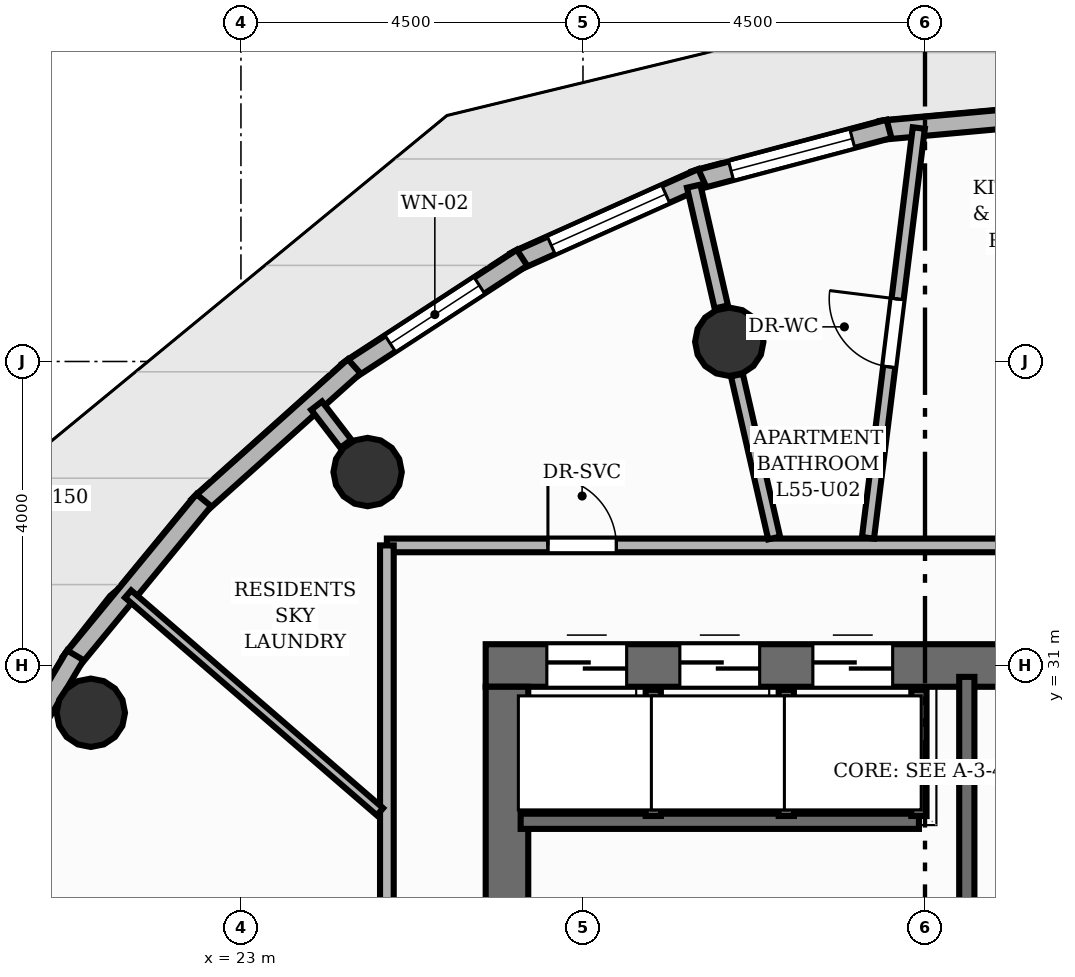
"""IFC4 building model, lengths in metres.
Left out: names, types, materials, properties, quantities, classifications, styles, units other than length and angle.
Written with IfcOpenShell. Run it as: python <this file> out.ifc"""

import sys

from ifc_helpers import new_model, si_unit, direction, frame, frame_2d, origin, origin_2d, place, context, subcontext, project, spatial, rectangle, circle, extrude, element, fill, save


model = new_model("IFC4")
c1 = context("Model", 3, precision=1e-05, world=origin(), true_north=direction((0.0, 1.0)))
c2 = subcontext(c1, "Body", "Model", "MODEL_VIEW")
j1 = project(units=[si_unit("LENGTHUNIT", "METRE"), si_unit("PLANEANGLEUNIT", "RADIAN")], contexts=[c1])
p1 = place(None, origin())
s1 = spatial("IfcSite", under=j1, at=p1, CompositionType="ELEMENT")
p2 = place(p1, origin())
s2 = spatial("IfcBuilding", under=s1, at=p2, CompositionType="ELEMENT")
p3 = place(p2, frame((0.0, 0.0, 185.44)))
s3 = spatial("IfcBuildingStorey", under=s2, at=p3, CompositionType="ELEMENT", Elevation=185.44)
p4 = place(p3, frame((26.22, 31.0, 0.0), z_axis=(0.0, 0.0, 1.0), x_axis=(1.0, 0.0, 0.0)))
e1 = element("IfcWall", 1, at=p4, inside=s3, PredefinedType="SHEAR", context=c2, shape_type="SweptSolid", body=[
    extrude(rectangle(XDim=11.56, YDim=0.56, at=frame_2d((5.78, 0.0))), origin(), (0.0, 0.0, 1.0), 3.2),
])
p5 = place(p4, frame((8.18, 0.0, 0.0)))
e2 = element("IfcOpeningElement", 2, at=p5, cuts=e1, PredefinedType="OPENING", context=c2, shape_type="SweptSolid", body=[
    extrude(rectangle(XDim=1.1, YDim=2.15, at=frame_2d((0.55, 1.075))), frame((0.0, 0.29, 0.0), z_axis=(0.0, -1.0, 0.0), x_axis=(1.0, 0.0, 0.0)), (0.0, 0.0, 1.0), 0.58),
])
p6 = place(p4, frame((0.805, 0.0, 0.0)))
e3 = element("IfcOpeningElement", 3, at=p6, cuts=e1, PredefinedType="OPENING", context=c2, shape_type="SweptSolid", body=[
    extrude(rectangle(XDim=1.05, YDim=2.15, at=frame_2d((0.525, 1.075))), frame((0.0, 0.29, 0.0), z_axis=(0.0, -1.0, 0.0), x_axis=(1.0, 0.0, 0.0)), (0.0, 0.0, 1.0), 0.58),
])
p7 = place(p4, frame((2.555, 0.0, 0.0)))
e4 = element("IfcOpeningElement", 4, at=p7, cuts=e1, PredefinedType="OPENING", context=c2, shape_type="SweptSolid", body=[
    extrude(rectangle(XDim=1.05, YDim=2.15, at=frame_2d((0.525, 1.075))), frame((0.0, 0.29, 0.0), z_axis=(0.0, -1.0, 0.0), x_axis=(1.0, 0.0, 0.0)), (0.0, 0.0, 1.0), 0.58),
])
p8 = place(p4, frame((4.305, 0.0, 0.0)))
e5 = element("IfcOpeningElement", 5, at=p8, cuts=e1, PredefinedType="OPENING", context=c2, shape_type="SweptSolid", body=[
    extrude(rectangle(XDim=1.05, YDim=2.15, at=frame_2d((0.525, 1.075))), frame((0.0, 0.29, 0.0), z_axis=(0.0, -1.0, 0.0), x_axis=(1.0, 0.0, 0.0)), (0.0, 0.0, 1.0), 0.58),
])
p9 = place(p3, frame((26.5, 17.28, 0.0), z_axis=(0.0, 0.0, 1.0), x_axis=(0.0, 1.0, 0.0)))
e6 = element("IfcWall", 6, at=p9, inside=s3, PredefinedType="SHEAR", context=c2, shape_type="SweptSolid", body=[
    extrude(rectangle(XDim=13.44, YDim=0.56, at=frame_2d((6.72, 0.0))), origin(), (0.0, 0.0, 1.0), 3.2),
])
for number, where, z_axis, x_axis in (
    (7, (29.425, 35.26, 0.0), (0.0, 0.0, 1.0), (1.0, 0.0, 0.0)),
    (8, (24.667, 33.545, 0.0), (0.0, 0.0, 1.0), (1.0, 0.0, 0.0)),
    (9, (21.025, 30.378, 0.0), (0.0, 0.0, 1.0), (1.0, 0.0, 0.0)),
):
    element("IfcColumn", number, at=place(p3, frame(where, z_axis=z_axis, x_axis=x_axis)), inside=s3, PredefinedType="COLUMN", context=c2, shape_type="SweptSolid", body=[
        extrude(circle(Radius=0.45, at=origin_2d()), origin(), (0.0, 0.0, 1.0), 3.2),
    ])
p10 = place(p3, frame((31.418, 38.042, 0.0), z_axis=(0.0, 0.0, 1.0), x_axis=(0.995895522128, 0.090510270169, 0.0)))
e10 = element("IfcWall", 10, at=p10, inside=s3, PredefinedType="SOLIDWALL", context=c2, shape_type="SweptSolid", body=[
    extrude(rectangle(XDim=2.592, YDim=0.25, at=frame_2d((1.296, 0.0))), origin(), (0.0, 0.0, 1.0), 2.96),
])
p11 = place(p3, frame((28.965, 37.381, 0.0), z_axis=(0.0, 0.0, 1.0), x_axis=(0.96652474621, 0.256573410476, 0.0)))
e11 = element("IfcWall", 11, at=p11, inside=s3, PredefinedType="SOLIDWALL", context=c2, shape_type="SweptSolid", body=[
    extrude(rectangle(XDim=2.651, YDim=0.25, at=frame_2d((1.325, 0.0))), origin(), (0.0, 0.0, 1.0), 2.96),
])
p12 = place(p11, frame((0.501, 0.0, 0.85)))
e12 = element("IfcOpeningElement", 12, at=p12, cuts=e11, PredefinedType="OPENING", context=c2, shape_type="SweptSolid", body=[
    extrude(rectangle(XDim=1.65, YDim=1.55, at=frame_2d((0.825, 0.775))), frame((0.0, 0.135, 0.0), z_axis=(0.0, -1.0, 0.0), x_axis=(1.0, 0.0, 0.0)), (0.0, 0.0, 1.0), 0.27),
])
p13 = place(p3, frame((26.603, 36.313, 0.0), z_axis=(0.0, 0.0, 1.0), x_axis=(0.912615139532, 0.408819773368, 0.0)))
e13 = element("IfcWall", 13, at=p13, inside=s3, PredefinedType="SOLIDWALL", context=c2, shape_type="SweptSolid", body=[
    extrude(rectangle(XDim=2.702, YDim=0.25, at=frame_2d((1.351, 0.0))), origin(), (0.0, 0.0, 1.0), 2.96),
])
p14 = place(p13, frame((0.526, 0.0, 0.85)))
e14 = element("IfcOpeningElement", 14, at=p14, cuts=e13, PredefinedType="OPENING", context=c2, shape_type="SweptSolid", body=[
    extrude(rectangle(XDim=1.65, YDim=1.55, at=frame_2d((0.825, 0.775))), frame((0.0, 0.135, 0.0), z_axis=(0.0, -1.0, 0.0), x_axis=(1.0, 0.0, 0.0)), (0.0, 0.0, 1.0), 0.27),
])
p15 = place(p3, frame((24.404, 34.87, 0.0), z_axis=(0.0, 0.0, 1.0), x_axis=(0.837860586987, 0.545884270496, 0.0)))
e15 = element("IfcWall", 15, at=p15, inside=s3, PredefinedType="SOLIDWALL", context=c2, shape_type="SweptSolid", body=[
    extrude(rectangle(XDim=2.739, YDim=0.25, at=frame_2d((1.369, 0.0))), origin(), (0.0, 0.0, 1.0), 2.96),
])
p16 = place(p15, frame((0.669, 0.0, 0.85)))
e16 = element("IfcOpeningElement", 16, at=p16, cuts=e15, PredefinedType="OPENING", context=c2, shape_type="SweptSolid", body=[
    extrude(rectangle(XDim=1.4, YDim=1.55, at=frame_2d((0.7, 0.775))), frame((0.0, 0.135, 0.0), z_axis=(0.0, -1.0, 0.0), x_axis=(1.0, 0.0, 0.0)), (0.0, 0.0, 1.0), 0.27),
])
for number, where, z_axis, x_axis in (
    (17, (22.436, 33.096, 0.0), (0.0, 0.0, 1.0), (0.745, 0.667, 0.0)),
    (18, (20.759, 31.045, 0.0), (0.0, 0.0, 1.0), (0.635, 0.772, 0.0)),
):
    element("IfcWall", number, at=place(p3, frame(where, z_axis=z_axis, x_axis=x_axis)), inside=s3, PredefinedType="SOLIDWALL", context=c2, shape_type="SweptSolid", body=[
        extrude(rectangle(XDim=2.758, YDim=0.25, at=frame_2d((1.379, 0.0))), origin(), (0.0, 0.0, 1.0), 2.96),
    ])
p17 = place(p3, frame((19.424, 28.779, 0.0), z_axis=(0.0, 0.0, 1.0), x_axis=(0.510320389621, 0.859984360287, 0.0)))
e19 = element("IfcWall", 19, at=p17, inside=s3, PredefinedType="SOLIDWALL", context=c2, shape_type="SweptSolid", body=[
    extrude(rectangle(XDim=2.738, YDim=0.25, at=frame_2d((1.369, 0.0))), origin(), (0.0, 0.0, 1.0), 2.96),
])
p18 = place(p17, frame((0.175, 0.0, 0.85)))
e20 = element("IfcOpeningElement", 20, at=p18, cuts=e19, PredefinedType="OPENING", context=c2, shape_type="SweptSolid", body=[
    extrude(rectangle(XDim=1.4, YDim=1.55, at=frame_2d((0.7, 0.775))), frame((0.0, 0.135, 0.0), z_axis=(0.0, -1.0, 0.0), x_axis=(1.0, 0.0, 0.0)), (0.0, 0.0, 1.0), 0.27),
])
p19 = place(p3, frame((32.55, 27.35, 0.0), z_axis=(0.0, 0.0, 1.0), x_axis=(0.0, 1.0, 0.0)))
e21 = element("IfcWall", 21, at=p19, inside=s3, PredefinedType="SHEAR", context=c2, shape_type="SweptSolid", body=[
    extrude(rectangle(XDim=3.5, YDim=0.2, at=frame_2d((1.75, 0.0))), origin(), (0.0, 0.0, 1.0), 3.2),
])
p20 = place(p3, frame((26.68, 28.95, 0.0), z_axis=(0.0, 0.0, 1.0), x_axis=(1.0, 0.0, 0.0)))
e22 = element("IfcWall", 22, at=p20, inside=s3, PredefinedType="SHEAR", context=c2, shape_type="SweptSolid", body=[
    extrude(rectangle(XDim=5.24, YDim=0.2, at=frame_2d((2.62, 0.0))), origin(), (0.0, 0.0, 1.0), 3.2),
])
for number, where, z_axis, x_axis in (
    (23, (31.92, 29.02, 0.0), (0.0, 0.0, 1.0), (0.0, 1.0, 0.0)),
    (24, (28.425, 29.02, 0.0), (0.0, 0.0, 1.0), (0.0, 1.0, 0.0)),
    (25, (30.175, 29.02, 0.0), (0.0, 0.0, 1.0), (0.0, 1.0, 0.0)),
):
    element("IfcWall", number, at=place(p3, frame(where, z_axis=z_axis, x_axis=x_axis)), inside=s3, PredefinedType="SHEAR", context=c2, shape_type="SweptSolid", body=[
        extrude(rectangle(XDim=1.66, YDim=0.2, at=frame_2d((0.83, 0.0))), origin(), (0.0, 0.0, 1.0), 3.2),
    ])
p21 = place(p3, frame((29.32, 35.718, 0.0), z_axis=(0.0, 0.0, 1.0), x_axis=(-0.222967107114, 0.974825968645, 0.0)))
e26 = element("IfcWall", 26, at=p21, inside=s3, PredefinedType="PARTITIONING", context=c2, shape_type="SweptSolid", body=[
    extrude(rectangle(XDim=1.63, YDim=0.18, at=frame_2d((0.815, 0.0))), origin(), (0.0, 0.0, 1.0), 2.404),
])
p22 = place(p3, frame((24.38, 33.918, 0.0), z_axis=(0.0, 0.0, 1.0), x_axis=(-0.609112888366, 0.793083532314, 0.0)))
e27 = element("IfcWall", 27, at=p22, inside=s3, PredefinedType="PARTITIONING", context=c2, shape_type="SweptSolid", body=[
    extrude(rectangle(XDim=0.632, YDim=0.18, at=frame_2d((0.316, 0.0))), origin(), (0.0, 0.0, 1.0), 2.404),
])
p23 = place(p3, frame((24.92, 32.58, 0.0), z_axis=(0.0, 0.0, 1.0), x_axis=(1.0, 0.0, 0.0)))
e28 = element("IfcWall", 28, at=p23, inside=s3, PredefinedType="PARTITIONING", context=c2, shape_type="SweptSolid", body=[
    extrude(rectangle(XDim=14.16, YDim=0.18, at=frame_2d((7.08, 0.0))), origin(), (0.0, 0.0, 1.0), 2.955),
])
p24 = place(p23, frame((8.186, 0.0, 0.0)))
e29 = element("IfcOpeningElement", 29, at=p24, cuts=e28, PredefinedType="OPENING", context=c2, shape_type="SweptSolid", body=[
    extrude(rectangle(XDim=1.05, YDim=2.15, at=frame_2d((0.525, 1.075))), frame((0.0, 0.1, 0.0), z_axis=(0.0, -1.0, 0.0), x_axis=(1.0, 0.0, 0.0)), (0.0, 0.0, 1.0), 0.2),
])
p25 = place(p23, frame((2.119, 0.0, 0.0)))
e30 = element("IfcOpeningElement", 30, at=p25, cuts=e28, PredefinedType="OPENING", context=c2, shape_type="SweptSolid", body=[
    extrude(rectangle(XDim=0.9, YDim=2.1, at=frame_2d((0.45, 1.05))), frame((0.0, 0.1, 0.0), z_axis=(0.0, -1.0, 0.0), x_axis=(1.0, 0.0, 0.0)), (0.0, 0.0, 1.0), 0.2),
])
p26 = place(p3, frame((24.92, 19.382, 0.0), z_axis=(0.0, 0.0, 1.0), x_axis=(0.0, 1.0, 0.0)))
e31 = element("IfcWall", 31, at=p26, inside=s3, PredefinedType="PARTITIONING", context=c2, shape_type="SweptSolid", body=[
    extrude(rectangle(XDim=13.198, YDim=0.18, at=frame_2d((6.599, 0.0))), origin(), (0.0, 0.0, 1.0), 2.955),
])
p27 = place(p26, frame((7.282, 0.0, 0.0)))
e32 = element("IfcOpeningElement", 32, at=p27, cuts=e31, PredefinedType="OPENING", context=c2, shape_type="SweptSolid", body=[
    extrude(rectangle(XDim=0.9, YDim=2.1, at=frame_2d((0.45, 1.05))), frame((0.0, 0.1, 0.0), z_axis=(0.0, -1.0, 0.0), x_axis=(1.0, 0.0, 0.0)), (0.0, 0.0, 1.0), 0.2),
])
p28 = place(p3, frame((31.25, 32.679, 0.0), z_axis=(0.0, 0.0, 1.0), x_axis=(0.123100196343, 0.992394247091, 0.0)))
e33 = element("IfcWall", 33, at=p28, inside=s3, PredefinedType="PLUMBINGWALL", context=c2, shape_type="SweptSolid", body=[
    extrude(rectangle(XDim=5.434, YDim=0.16, at=frame_2d((2.717, 0.0))), origin(), (0.0, 0.0, 1.0), 2.692),
])
p29 = place(p28, frame((2.267, 0.0, 0.0)))
e34 = element("IfcOpeningElement", 34, at=p29, cuts=e33, PredefinedType="OPENING", context=c2, shape_type="SweptSolid", body=[
    extrude(rectangle(XDim=0.9, YDim=2.1, at=frame_2d((0.45, 1.05))), frame((0.0, 0.09, 0.0), z_axis=(0.0, -1.0, 0.0), x_axis=(1.0, 0.0, 0.0)), (0.0, 0.0, 1.0), 0.18),
])
p30 = place(p3, frame((30.015, 32.677, 0.0), z_axis=(0.0, 0.0, 1.0), x_axis=(-0.222969522248, 0.974825416241, 0.0)))
e35 = element("IfcWall", 35, at=p30, inside=s3, PredefinedType="PLUMBINGWALL", context=c2, shape_type="SweptSolid", body=[
    extrude(rectangle(XDim=2.199, YDim=0.16, at=frame_2d((1.099, 0.0))), origin(), (0.0, 0.0, 1.0), 2.404),
])
p31 = place(p3, frame((21.515, 31.941, 0.0), z_axis=(0.0, 0.0, 1.0), x_axis=(0.756468247818, -0.654030419815, 0.0)))
e36 = element("IfcWall", 36, at=p31, inside=s3, PredefinedType="PARTITIONING", context=c2, shape_type="SweptSolid", body=[
    extrude(rectangle(XDim=4.381, YDim=0.125, at=frame_2d((2.19, 0.0))), origin(), (0.0, 0.0, 1.0), 2.692),
])
p32 = place(p12, origin())
e37 = element("IfcWindow", 37, at=p32, inside=s3, PartitioningType="SINGLE_PANEL", PredefinedType="WINDOW", context=c2, shape_type="SweptSolid", body=[
    extrude(rectangle(XDim=1.65, YDim=1.55, at=frame_2d((0.825, 0.775))), frame((0.0, 0.03, 0.0), z_axis=(0.0, -1.0, 0.0), x_axis=(1.0, 0.0, 0.0)), (0.0, 0.0, 1.0), 0.06),
])
fill(e12, e37)
p33 = place(p14, origin())
e38 = element("IfcWindow", 38, at=p33, inside=s3, PartitioningType="SINGLE_PANEL", PredefinedType="WINDOW", context=c2, shape_type="SweptSolid", body=[
    extrude(rectangle(XDim=1.65, YDim=1.55, at=frame_2d((0.825, 0.775))), frame((0.0, 0.03, 0.0), z_axis=(0.0, -1.0, 0.0), x_axis=(1.0, 0.0, 0.0)), (0.0, 0.0, 1.0), 0.06),
])
fill(e14, e38)
p34 = place(p16, origin())
e39 = element("IfcWindow", 39, at=p34, inside=s3, PartitioningType="SINGLE_PANEL", PredefinedType="WINDOW", context=c2, shape_type="SweptSolid", body=[
    extrude(rectangle(XDim=1.4, YDim=1.55, at=frame_2d((0.7, 0.775))), frame((0.0, 0.03, 0.0), z_axis=(0.0, -1.0, 0.0), x_axis=(1.0, 0.0, 0.0)), (0.0, 0.0, 1.0), 0.06),
])
fill(e16, e39)
p35 = place(p6, origin())
e40 = element("IfcDoor", 40, at=p35, inside=s3, OperationType="DOUBLE_DOOR_SLIDING", PredefinedType="DOOR", context=c2, shape_type="SweptSolid", body=[
    extrude(rectangle(XDim=1.05, YDim=2.15, at=frame_2d((0.525, 1.075))), frame((0.0, 0.025, 0.0), z_axis=(0.0, -1.0, 0.0), x_axis=(1.0, 0.0, 0.0)), (0.0, 0.0, 1.0), 0.05),
])
fill(e3, e40)
p36 = place(p7, origin())
e41 = element("IfcDoor", 41, at=p36, inside=s3, OperationType="DOUBLE_DOOR_SLIDING", PredefinedType="DOOR", context=c2, shape_type="SweptSolid", body=[
    extrude(rectangle(XDim=1.05, YDim=2.15, at=frame_2d((0.525, 1.075))), frame((0.0, 0.025, 0.0), z_axis=(0.0, -1.0, 0.0), x_axis=(1.0, 0.0, 0.0)), (0.0, 0.0, 1.0), 0.05),
])
fill(e4, e41)
p37 = place(p8, origin())
e42 = element("IfcDoor", 42, at=p37, inside=s3, OperationType="DOUBLE_DOOR_SLIDING", PredefinedType="DOOR", context=c2, shape_type="SweptSolid", body=[
    extrude(rectangle(XDim=1.05, YDim=2.15, at=frame_2d((0.525, 1.075))), frame((0.0, 0.025, 0.0), z_axis=(0.0, -1.0, 0.0), x_axis=(1.0, 0.0, 0.0)), (0.0, 0.0, 1.0), 0.05),
])
fill(e5, e42)
p38 = place(p29, origin())
e43 = element("IfcDoor", 43, at=p38, inside=s3, OperationType="SINGLE_SWING_RIGHT", PredefinedType="DOOR", context=c2, shape_type="SweptSolid", body=[
    extrude(rectangle(XDim=0.9, YDim=2.1, at=frame_2d((0.45, 1.05))), frame((0.0, 0.025, 0.0), z_axis=(0.0, -1.0, 0.0), x_axis=(1.0, 0.0, 0.0)), (0.0, 0.0, 1.0), 0.05),
])
fill(e34, e43)
p39 = place(p25, origin())
e44 = element("IfcDoor", 44, at=p39, inside=s3, OperationType="SINGLE_SWING_LEFT", PredefinedType="DOOR", context=c2, shape_type="SweptSolid", body=[
    extrude(rectangle(XDim=0.9, YDim=2.1, at=frame_2d((0.45, 1.05))), frame((0.0, 0.025, 0.0), z_axis=(0.0, -1.0, 0.0), x_axis=(1.0, 0.0, 0.0)), (0.0, 0.0, 1.0), 0.05),
])
fill(e30, e44)
save(model, sys.argv[1])
